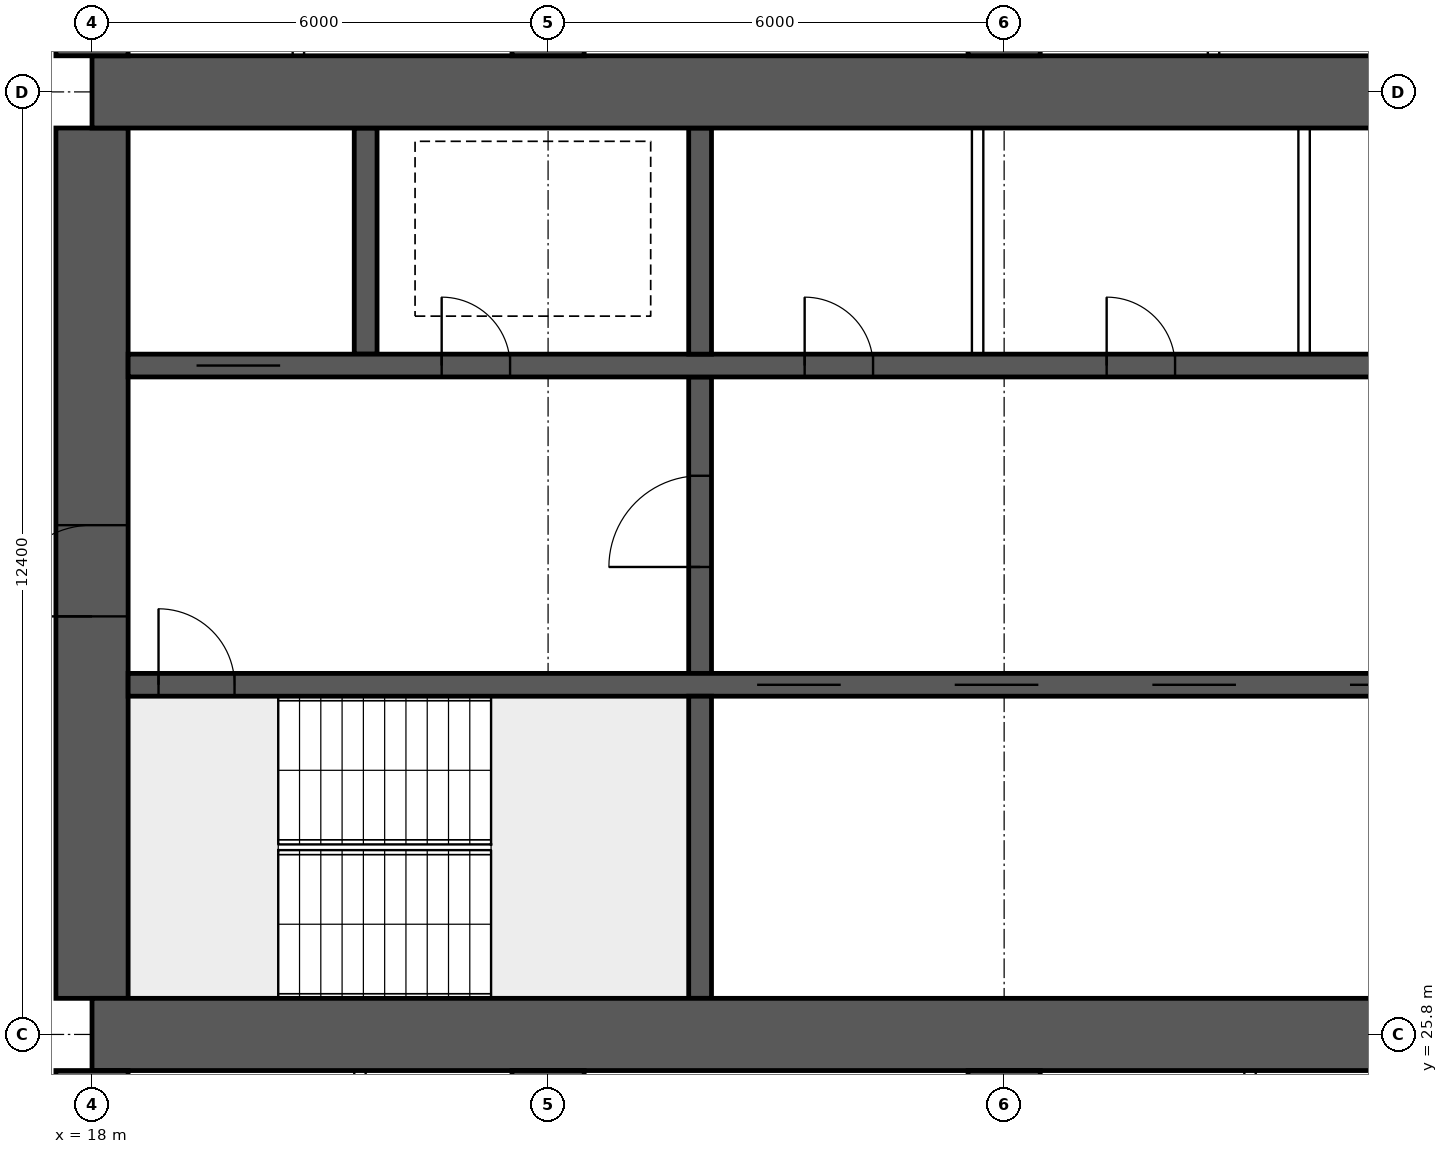
"""IFC4 building model, lengths in metres.
Left out: names, types, materials, properties, quantities, classifications, styles, units other than length and angle.
Written with IfcOpenShell. Run it as: python <this file> out.ifc"""

import sys

from ifc_helpers import new_model, si_unit, direction, frame, frame_2d, origin, place, context, subcontext, project, spatial, rectangle, extrude, element, fill, save


model = new_model("IFC4")
c1 = context("Model", 3, precision=1e-05, world=origin(), true_north=direction((0.0, 1.0)))
c2 = subcontext(c1, "Body", "Model", "MODEL_VIEW")
j1 = project(units=[si_unit("LENGTHUNIT", "METRE"), si_unit("PLANEANGLEUNIT", "RADIAN")], contexts=[c1])
p1 = place(None, origin())
s1 = spatial("IfcSite", under=j1, at=p1, CompositionType="ELEMENT")
p2 = place(p1, origin())
s2 = spatial("IfcBuilding", under=s1, at=p2, CompositionType="ELEMENT")
p3 = place(p2, frame((0.0, 0.0, 95.65)))
s3 = spatial("IfcBuildingStorey", under=s2, at=p3, CompositionType="ELEMENT", Elevation=95.65)
for number, where, z_axis, x_axis in (
    (1, (18.0, 25.8, 0.0), (0.0, 0.0, 1.0), (1.0, 0.0, 0.0)),
    (2, (18.0, 38.2, 0.0), (0.0, 0.0, 1.0), (1.0, 0.0, 0.0)),
):
    element("IfcWall", number, at=place(p3, frame(where, z_axis=z_axis, x_axis=x_axis)), inside=s3, PredefinedType="SHEAR", context=c2, shape_type="SweptSolid", body=[
        extrude(rectangle(XDim=48.0, YDim=0.95, at=frame_2d((24.0, 0.0))), origin(), (0.0, 0.0, 1.0), 3.75),
    ])
p4 = place(p3, frame((18.0, 26.275, 0.0), z_axis=(0.0, 0.0, 1.0), x_axis=(0.0, 1.0, 0.0)))
e3 = element("IfcWall", 3, at=p4, inside=s3, PredefinedType="SHEAR", context=c2, shape_type="SweptSolid", body=[
    extrude(rectangle(XDim=11.45, YDim=0.95, at=frame_2d((5.725, 0.0))), origin(), (0.0, 0.0, 1.0), 3.75),
])
p5 = place(p4, frame((5.025, 0.0, 0.0)))
e4 = element("IfcOpeningElement", 4, at=p5, cuts=e3, PredefinedType="OPENING", context=c2, shape_type="SweptSolid", body=[
    extrude(rectangle(XDim=1.2, YDim=2.1, at=frame_2d((0.6, 1.05))), frame((0.0, 0.485, 0.0), z_axis=(0.0, -1.0, 0.0), x_axis=(1.0, 0.0, 0.0)), (0.0, 0.0, 1.0), 0.97),
])
p6 = place(p3, frame((18.475, 30.4, 0.0), z_axis=(0.0, 0.0, 1.0), x_axis=(1.0, 0.0, 0.0)))
e5 = element("IfcWall", 5, at=p6, inside=s3, PredefinedType="SHEAR", context=c2, shape_type="SweptSolid", body=[
    extrude(rectangle(XDim=47.05, YDim=0.3, at=frame_2d((23.525, 0.0))), origin(), (0.0, 0.0, 1.0), 3.75),
])
p7 = place(p6, frame((0.4, 0.0, 0.0)))
e6 = element("IfcOpeningElement", 6, at=p7, cuts=e5, PredefinedType="OPENING", context=c2, shape_type="SweptSolid", body=[
    extrude(rectangle(XDim=1.0, YDim=2.1, at=frame_2d((0.5, 1.05))), frame((0.0, 0.16, 0.0), z_axis=(0.0, -1.0, 0.0), x_axis=(1.0, 0.0, 0.0)), (0.0, 0.0, 1.0), 0.32),
])
p8 = place(p6, frame((45.65, 0.0, 0.0)))
e7 = element("IfcOpeningElement", 7, at=p8, cuts=e5, PredefinedType="OPENING", context=c2, shape_type="SweptSolid", body=[
    extrude(rectangle(XDim=1.0, YDim=2.1, at=frame_2d((0.5, 1.05))), frame((0.0, 0.16, 0.0), z_axis=(0.0, -1.0, 0.0), x_axis=(1.0, 0.0, 0.0)), (0.0, 0.0, 1.0), 0.32),
])
p9 = place(p6, frame((8.275, 0.0, 0.0)))
e8 = element("IfcOpeningElement", 8, at=p9, cuts=e5, PredefinedType="OPENING", context=c2, shape_type="SweptSolid", body=[
    extrude(rectangle(XDim=1.1, YDim=2.1, at=frame_2d((0.55, 1.05))), frame((0.0, 0.16, 0.0), z_axis=(0.0, -1.0, 0.0), x_axis=(1.0, 0.0, 0.0)), (0.0, 0.0, 1.0), 0.32),
])
p10 = place(p6, frame((10.875, 0.0, 0.0)))
e9 = element("IfcOpeningElement", 9, at=p10, cuts=e5, PredefinedType="OPENING", context=c2, shape_type="SweptSolid", body=[
    extrude(rectangle(XDim=1.1, YDim=2.1, at=frame_2d((0.55, 1.05))), frame((0.0, 0.16, 0.0), z_axis=(0.0, -1.0, 0.0), x_axis=(1.0, 0.0, 0.0)), (0.0, 0.0, 1.0), 0.32),
])
p11 = place(p6, frame((13.475, 0.0, 0.0)))
e10 = element("IfcOpeningElement", 10, at=p11, cuts=e5, PredefinedType="OPENING", context=c2, shape_type="SweptSolid", body=[
    extrude(rectangle(XDim=1.1, YDim=2.1, at=frame_2d((0.55, 1.05))), frame((0.0, 0.16, 0.0), z_axis=(0.0, -1.0, 0.0), x_axis=(1.0, 0.0, 0.0)), (0.0, 0.0, 1.0), 0.32),
])
p12 = place(p6, frame((16.075, 0.0, 0.0)))
e11 = element("IfcOpeningElement", 11, at=p12, cuts=e5, PredefinedType="OPENING", context=c2, shape_type="SweptSolid", body=[
    extrude(rectangle(XDim=1.1, YDim=2.1, at=frame_2d((0.55, 1.05))), frame((0.0, 0.16, 0.0), z_axis=(0.0, -1.0, 0.0), x_axis=(1.0, 0.0, 0.0)), (0.0, 0.0, 1.0), 0.32),
])
p13 = place(p6, frame((18.85, 0.0, 0.0)))
e12 = element("IfcOpeningElement", 12, at=p13, cuts=e5, PredefinedType="OPENING", context=c2, shape_type="SweptSolid", body=[
    extrude(rectangle(XDim=0.9, YDim=2.1, at=frame_2d((0.45, 1.05))), frame((0.0, 0.16, 0.0), z_axis=(0.0, -1.0, 0.0), x_axis=(1.0, 0.0, 0.0)), (0.0, 0.0, 1.0), 0.32),
])
p14 = place(p6, frame((30.142, 0.0, 0.0)))
e13 = element("IfcOpeningElement", 13, at=p14, cuts=e5, PredefinedType="OPENING", context=c2, shape_type="SweptSolid", body=[
    extrude(rectangle(XDim=1.1, YDim=2.1, at=frame_2d((0.55, 1.05))), frame((0.0, 0.16, 0.0), z_axis=(0.0, -1.0, 0.0), x_axis=(1.0, 0.0, 0.0)), (0.0, 0.0, 1.0), 0.32),
])
p15 = place(p6, frame((33.675, 0.0, 0.0)))
e14 = element("IfcOpeningElement", 14, at=p15, cuts=e5, PredefinedType="OPENING", context=c2, shape_type="SweptSolid", body=[
    extrude(rectangle(XDim=1.1, YDim=2.1, at=frame_2d((0.55, 1.05))), frame((0.0, 0.16, 0.0), z_axis=(0.0, -1.0, 0.0), x_axis=(1.0, 0.0, 0.0)), (0.0, 0.0, 1.0), 0.32),
])
p16 = place(p6, frame((37.208, 0.0, 0.0)))
e15 = element("IfcOpeningElement", 15, at=p16, cuts=e5, PredefinedType="OPENING", context=c2, shape_type="SweptSolid", body=[
    extrude(rectangle(XDim=1.1, YDim=2.1, at=frame_2d((0.55, 1.05))), frame((0.0, 0.16, 0.0), z_axis=(0.0, -1.0, 0.0), x_axis=(1.0, 0.0, 0.0)), (0.0, 0.0, 1.0), 0.32),
])
p17 = place(p3, frame((18.475, 34.6, 0.0), z_axis=(0.0, 0.0, 1.0), x_axis=(1.0, 0.0, 0.0)))
e16 = element("IfcWall", 16, at=p17, inside=s3, PredefinedType="SHEAR", context=c2, shape_type="SweptSolid", body=[
    extrude(rectangle(XDim=47.05, YDim=0.3, at=frame_2d((23.525, 0.0))), origin(), (0.0, 0.0, 1.0), 3.75),
])
p18 = place(p17, frame((0.9, 0.0, 0.0)))
e17 = element("IfcOpeningElement", 17, at=p18, cuts=e16, PredefinedType="OPENING", context=c2, shape_type="SweptSolid", body=[
    extrude(rectangle(XDim=1.1, YDim=2.1, at=frame_2d((0.55, 1.05))), frame((0.0, 0.16, 0.0), z_axis=(0.0, -1.0, 0.0), x_axis=(1.0, 0.0, 0.0)), (0.0, 0.0, 1.0), 0.32),
])
p19 = place(p17, frame((45.05, 0.0, 0.0)))
e18 = element("IfcOpeningElement", 18, at=p19, cuts=e16, PredefinedType="OPENING", context=c2, shape_type="SweptSolid", body=[
    extrude(rectangle(XDim=1.1, YDim=2.1, at=frame_2d((0.55, 1.05))), frame((0.0, 0.16, 0.0), z_axis=(0.0, -1.0, 0.0), x_axis=(1.0, 0.0, 0.0)), (0.0, 0.0, 1.0), 0.32),
])
p20 = place(p17, frame((4.125, 0.0, 0.0)))
e19 = element("IfcOpeningElement", 19, at=p20, cuts=e16, PredefinedType="OPENING", context=c2, shape_type="SweptSolid", body=[
    extrude(rectangle(XDim=0.9, YDim=2.1, at=frame_2d((0.45, 1.05))), frame((0.0, 0.16, 0.0), z_axis=(0.0, -1.0, 0.0), x_axis=(1.0, 0.0, 0.0)), (0.0, 0.0, 1.0), 0.32),
])
p21 = place(p17, frame((42.025, 0.0, 0.0)))
e20 = element("IfcOpeningElement", 20, at=p21, cuts=e16, PredefinedType="OPENING", context=c2, shape_type="SweptSolid", body=[
    extrude(rectangle(XDim=0.9, YDim=2.1, at=frame_2d((0.45, 1.05))), frame((0.0, 0.16, 0.0), z_axis=(0.0, -1.0, 0.0), x_axis=(1.0, 0.0, 0.0)), (0.0, 0.0, 1.0), 0.32),
])
p22 = place(p17, frame((8.9, 0.0, 0.0)))
e21 = element("IfcOpeningElement", 21, at=p22, cuts=e16, PredefinedType="OPENING", context=c2, shape_type="SweptSolid", body=[
    extrude(rectangle(XDim=0.9, YDim=2.1, at=frame_2d((0.45, 1.05))), frame((0.0, 0.16, 0.0), z_axis=(0.0, -1.0, 0.0), x_axis=(1.0, 0.0, 0.0)), (0.0, 0.0, 1.0), 0.32),
])
p23 = place(p17, frame((12.874, 0.0, 0.0)))
e22 = element("IfcOpeningElement", 22, at=p23, cuts=e16, PredefinedType="OPENING", context=c2, shape_type="SweptSolid", body=[
    extrude(rectangle(XDim=0.9, YDim=2.1, at=frame_2d((0.45, 1.05))), frame((0.0, 0.16, 0.0), z_axis=(0.0, -1.0, 0.0), x_axis=(1.0, 0.0, 0.0)), (0.0, 0.0, 1.0), 0.32),
])
p24 = place(p17, frame((16.521, 0.0, 0.0)))
e23 = element("IfcOpeningElement", 23, at=p24, cuts=e16, PredefinedType="OPENING", context=c2, shape_type="SweptSolid", body=[
    extrude(rectangle(XDim=0.9, YDim=2.1, at=frame_2d((0.45, 1.05))), frame((0.0, 0.16, 0.0), z_axis=(0.0, -1.0, 0.0), x_axis=(1.0, 0.0, 0.0)), (0.0, 0.0, 1.0), 0.32),
])
p25 = place(p17, frame((20.28, 0.0, 0.0)))
e24 = element("IfcOpeningElement", 24, at=p25, cuts=e16, PredefinedType="OPENING", context=c2, shape_type="SweptSolid", body=[
    extrude(rectangle(XDim=0.9, YDim=2.1, at=frame_2d((0.45, 1.05))), frame((0.0, 0.16, 0.0), z_axis=(0.0, -1.0, 0.0), x_axis=(1.0, 0.0, 0.0)), (0.0, 0.0, 1.0), 0.32),
])
p26 = place(p17, frame((24.686, 0.0, 0.0)))
e25 = element("IfcOpeningElement", 25, at=p26, cuts=e16, PredefinedType="OPENING", context=c2, shape_type="SweptSolid", body=[
    extrude(rectangle(XDim=0.9, YDim=2.1, at=frame_2d((0.45, 1.05))), frame((0.0, 0.16, 0.0), z_axis=(0.0, -1.0, 0.0), x_axis=(1.0, 0.0, 0.0)), (0.0, 0.0, 1.0), 0.32),
])
p27 = place(p17, frame((27.483, 0.0, 0.0)))
e26 = element("IfcOpeningElement", 26, at=p27, cuts=e16, PredefinedType="OPENING", context=c2, shape_type="SweptSolid", body=[
    extrude(rectangle(XDim=0.9, YDim=2.1, at=frame_2d((0.45, 1.05))), frame((0.0, 0.16, 0.0), z_axis=(0.0, -1.0, 0.0), x_axis=(1.0, 0.0, 0.0)), (0.0, 0.0, 1.0), 0.32),
])
p28 = place(p17, frame((30.666, 0.0, 0.0)))
e27 = element("IfcOpeningElement", 27, at=p28, cuts=e16, PredefinedType="OPENING", context=c2, shape_type="SweptSolid", body=[
    extrude(rectangle(XDim=0.9, YDim=2.1, at=frame_2d((0.45, 1.05))), frame((0.0, 0.16, 0.0), z_axis=(0.0, -1.0, 0.0), x_axis=(1.0, 0.0, 0.0)), (0.0, 0.0, 1.0), 0.32),
])
p29 = place(p17, frame((34.617, 0.0, 0.0)))
e28 = element("IfcOpeningElement", 28, at=p29, cuts=e16, PredefinedType="OPENING", context=c2, shape_type="SweptSolid", body=[
    extrude(rectangle(XDim=0.9, YDim=2.1, at=frame_2d((0.45, 1.05))), frame((0.0, 0.16, 0.0), z_axis=(0.0, -1.0, 0.0), x_axis=(1.0, 0.0, 0.0)), (0.0, 0.0, 1.0), 0.32),
])
p30 = place(p17, frame((37.555, 0.0, 0.0)))
e29 = element("IfcOpeningElement", 29, at=p30, cuts=e16, PredefinedType="OPENING", context=c2, shape_type="SweptSolid", body=[
    extrude(rectangle(XDim=0.9, YDim=2.1, at=frame_2d((0.45, 1.05))), frame((0.0, 0.16, 0.0), z_axis=(0.0, -1.0, 0.0), x_axis=(1.0, 0.0, 0.0)), (0.0, 0.0, 1.0), 0.32),
])
p31 = place(p3, frame((26.0, 26.275, 0.0), z_axis=(0.0, 0.0, 1.0), x_axis=(0.0, 1.0, 0.0)))
e30 = element("IfcWall", 30, at=p31, inside=s3, PredefinedType="SHEAR", context=c2, shape_type="SweptSolid", body=[
    extrude(rectangle(XDim=3.975, YDim=0.3, at=frame_2d((1.988, 0.0))), origin(), (0.0, 0.0, 1.0), 3.75),
])
p32 = place(p3, frame((26.0, 30.55, 0.0), z_axis=(0.0, 0.0, 1.0), x_axis=(0.0, 1.0, 0.0)))
e31 = element("IfcWall", 31, at=p32, inside=s3, PredefinedType="SHEAR", context=c2, shape_type="SweptSolid", body=[
    extrude(rectangle(XDim=3.9, YDim=0.3, at=frame_2d((1.95, 0.0))), origin(), (0.0, 0.0, 1.0), 3.75),
])
p33 = place(p32, frame((1.4, 0.0, 0.0)))
e32 = element("IfcOpeningElement", 32, at=p33, cuts=e31, PredefinedType="OPENING", context=c2, shape_type="SweptSolid", body=[
    extrude(rectangle(XDim=1.2, YDim=2.1, at=frame_2d((0.6, 1.05))), frame((0.0, 0.16, 0.0), z_axis=(0.0, -1.0, 0.0), x_axis=(1.0, 0.0, 0.0)), (0.0, 0.0, 1.0), 0.32),
])
for number, where, z_axis, x_axis in (
    (33, (21.6, 34.75, 0.0), (0.0, 0.0, 1.0), (0.0, 1.0, 0.0)),
    (34, (26.0, 34.75, 0.0), (0.0, 0.0, 1.0), (0.0, 1.0, 0.0)),
):
    element("IfcWall", number, at=place(p3, frame(where, z_axis=z_axis, x_axis=x_axis)), inside=s3, PredefinedType="SHEAR", context=c2, shape_type="SweptSolid", body=[
        extrude(rectangle(XDim=2.975, YDim=0.3, at=frame_2d((1.488, 0.0))), origin(), (0.0, 0.0, 1.0), 3.75),
    ])
for number, where, z_axis, x_axis in (
    (35, (18.0, 16.0, 0.0), (0.0, 0.0, 1.0), (0.0, 1.0, 0.0)),
    (36, (18.0, 38.675, 0.0), (0.0, 0.0, 1.0), (0.0, 1.0, 0.0)),
    (37, (24.0, 16.0, 0.0), (0.0, 0.0, 1.0), (0.0, 1.0, 0.0)),
    (38, (24.0, 38.675, 0.0), (0.0, 0.0, 1.0), (0.0, 1.0, 0.0)),
    (39, (30.0, 16.0, 0.0), (0.0, 0.0, 1.0), (0.0, 1.0, 0.0)),
    (40, (30.0, 38.675, 0.0), (0.0, 0.0, 1.0), (0.0, 1.0, 0.0)),
):
    element("IfcWall", number, at=place(p3, frame(where, z_axis=z_axis, x_axis=x_axis)), inside=s3, PredefinedType="SHEAR", context=c2, shape_type="SweptSolid", body=[
        extrude(rectangle(XDim=9.325, YDim=0.95, at=frame_2d((4.663, 0.0))), origin(), (0.0, 0.0, 1.0), 3.75),
    ])
for number, where, z_axis, x_axis in (
    (41, (29.651, 34.75, 0.0), (0.0, 0.0, 1.0), (0.0, 1.0, 0.0)),
    (42, (33.946, 34.75, 0.0), (0.0, 0.0, 1.0), (0.0, 1.0, 0.0)),
):
    element("IfcWall", number, at=place(p3, frame(where, z_axis=z_axis, x_axis=x_axis)), inside=s3, PredefinedType="SOLIDWALL", context=c2, shape_type="SweptSolid", body=[
        extrude(rectangle(XDim=2.975, YDim=0.15, at=frame_2d((1.488, 0.0))), origin(), (0.0, 0.0, 1.0), 3.3),
    ])
for number, where, z_axis, x_axis in (
    (43, (21.525, 16.1, 0.0), (0.0, 0.0, 1.0), (0.0, 1.0, 0.0)),
    (44, (33.235, 16.1, 0.0), (0.0, 0.0, 1.0), (0.0, 1.0, 0.0)),
    (45, (20.715, 38.675, 0.0), (0.0, 0.0, 1.0), (0.0, 1.0, 0.0)),
    (46, (32.755, 38.675, 0.0), (0.0, 0.0, 1.0), (0.0, 1.0, 0.0)),
):
    element("IfcWall", number, at=place(p3, frame(where, z_axis=z_axis, x_axis=x_axis)), inside=s3, PredefinedType="PARTITIONING", context=c2, shape_type="SweptSolid", body=[
        extrude(rectangle(XDim=9.225, YDim=0.15, at=frame_2d((4.612, 0.0))), origin(), (0.0, 0.0, 1.0), 3.3),
    ])
p34 = place(p5, origin())
e47 = element("IfcDoor", 47, at=p34, inside=s3, OperationType="SINGLE_SWING_LEFT", PredefinedType="DOOR", context=c2, shape_type="SweptSolid", body=[
    extrude(rectangle(XDim=1.2, YDim=2.1, at=frame_2d((0.6, 1.05))), frame((0.0, 0.025, 0.0), z_axis=(0.0, -1.0, 0.0), x_axis=(1.0, 0.0, 0.0)), (0.0, 0.0, 1.0), 0.05),
])
fill(e4, e47)
p35 = place(p7, origin())
e48 = element("IfcDoor", 48, at=p35, inside=s3, OperationType="SINGLE_SWING_LEFT", PredefinedType="DOOR", context=c2, shape_type="SweptSolid", body=[
    extrude(rectangle(XDim=1.0, YDim=2.1, at=frame_2d((0.5, 1.05))), frame((0.0, 0.025, 0.0), z_axis=(0.0, -1.0, 0.0), x_axis=(1.0, 0.0, 0.0)), (0.0, 0.0, 1.0), 0.05),
])
fill(e6, e48)
p36 = place(p18, origin())
e49 = element("IfcDoor", 49, at=p36, inside=s3, OperationType="DOUBLE_DOOR_SLIDING", PredefinedType="DOOR", context=c2, shape_type="SweptSolid", body=[
    extrude(rectangle(XDim=1.1, YDim=2.1, at=frame_2d((0.55, 1.05))), frame((0.0, 0.025, 0.0), z_axis=(0.0, -1.0, 0.0), x_axis=(1.0, 0.0, 0.0)), (0.0, 0.0, 1.0), 0.05),
])
fill(e17, e49)
p37 = place(p20, origin())
e50 = element("IfcDoor", 50, at=p37, inside=s3, OperationType="SINGLE_SWING_LEFT", PredefinedType="DOOR", context=c2, shape_type="SweptSolid", body=[
    extrude(rectangle(XDim=0.9, YDim=2.1, at=frame_2d((0.45, 1.05))), frame((0.0, 0.025, 0.0), z_axis=(0.0, -1.0, 0.0), x_axis=(1.0, 0.0, 0.0)), (0.0, 0.0, 1.0), 0.05),
])
fill(e19, e50)
p38 = place(p33, origin())
e51 = element("IfcDoor", 51, at=p38, inside=s3, OperationType="SINGLE_SWING_LEFT", PredefinedType="DOOR", context=c2, shape_type="SweptSolid", body=[
    extrude(rectangle(XDim=1.2, YDim=2.1, at=frame_2d((0.6, 1.05))), frame((0.0, 0.025, 0.0), z_axis=(0.0, -1.0, 0.0), x_axis=(1.0, 0.0, 0.0)), (0.0, 0.0, 1.0), 0.05),
])
fill(e32, e51)
p39 = place(p22, origin())
e52 = element("IfcDoor", 52, at=p39, inside=s3, OperationType="SINGLE_SWING_LEFT", PredefinedType="DOOR", context=c2, shape_type="SweptSolid", body=[
    extrude(rectangle(XDim=0.9, YDim=2.1, at=frame_2d((0.45, 1.05))), frame((0.0, 0.025, 0.0), z_axis=(0.0, -1.0, 0.0), x_axis=(1.0, 0.0, 0.0)), (0.0, 0.0, 1.0), 0.05),
])
fill(e21, e52)
p40 = place(p23, origin())
e53 = element("IfcDoor", 53, at=p40, inside=s3, OperationType="SINGLE_SWING_LEFT", PredefinedType="DOOR", context=c2, shape_type="SweptSolid", body=[
    extrude(rectangle(XDim=0.9, YDim=2.1, at=frame_2d((0.45, 1.05))), frame((0.0, 0.025, 0.0), z_axis=(0.0, -1.0, 0.0), x_axis=(1.0, 0.0, 0.0)), (0.0, 0.0, 1.0), 0.05),
])
fill(e22, e53)
p41 = place(p9, origin())
e54 = element("IfcDoor", 54, at=p41, inside=s3, OperationType="DOUBLE_DOOR_SLIDING", PredefinedType="DOOR", context=c2, shape_type="SweptSolid", body=[
    extrude(rectangle(XDim=1.1, YDim=2.1, at=frame_2d((0.55, 1.05))), frame((0.0, 0.025, 0.0), z_axis=(0.0, -1.0, 0.0), x_axis=(1.0, 0.0, 0.0)), (0.0, 0.0, 1.0), 0.05),
])
fill(e8, e54)
p42 = place(p10, origin())
e55 = element("IfcDoor", 55, at=p42, inside=s3, OperationType="DOUBLE_DOOR_SLIDING", PredefinedType="DOOR", context=c2, shape_type="SweptSolid", body=[
    extrude(rectangle(XDim=1.1, YDim=2.1, at=frame_2d((0.55, 1.05))), frame((0.0, 0.025, 0.0), z_axis=(0.0, -1.0, 0.0), x_axis=(1.0, 0.0, 0.0)), (0.0, 0.0, 1.0), 0.05),
])
fill(e9, e55)
p43 = place(p11, origin())
e56 = element("IfcDoor", 56, at=p43, inside=s3, OperationType="DOUBLE_DOOR_SLIDING", PredefinedType="DOOR", context=c2, shape_type="SweptSolid", body=[
    extrude(rectangle(XDim=1.1, YDim=2.1, at=frame_2d((0.55, 1.05))), frame((0.0, 0.025, 0.0), z_axis=(0.0, -1.0, 0.0), x_axis=(1.0, 0.0, 0.0)), (0.0, 0.0, 1.0), 0.05),
])
fill(e10, e56)
p44 = place(p12, origin())
e57 = element("IfcDoor", 57, at=p44, inside=s3, OperationType="DOUBLE_DOOR_SLIDING", PredefinedType="DOOR", context=c2, shape_type="SweptSolid", body=[
    extrude(rectangle(XDim=1.1, YDim=2.1, at=frame_2d((0.55, 1.05))), frame((0.0, 0.025, 0.0), z_axis=(0.0, -1.0, 0.0), x_axis=(1.0, 0.0, 0.0)), (0.0, 0.0, 1.0), 0.05),
])
fill(e11, e57)
save(model, sys.argv[1])
